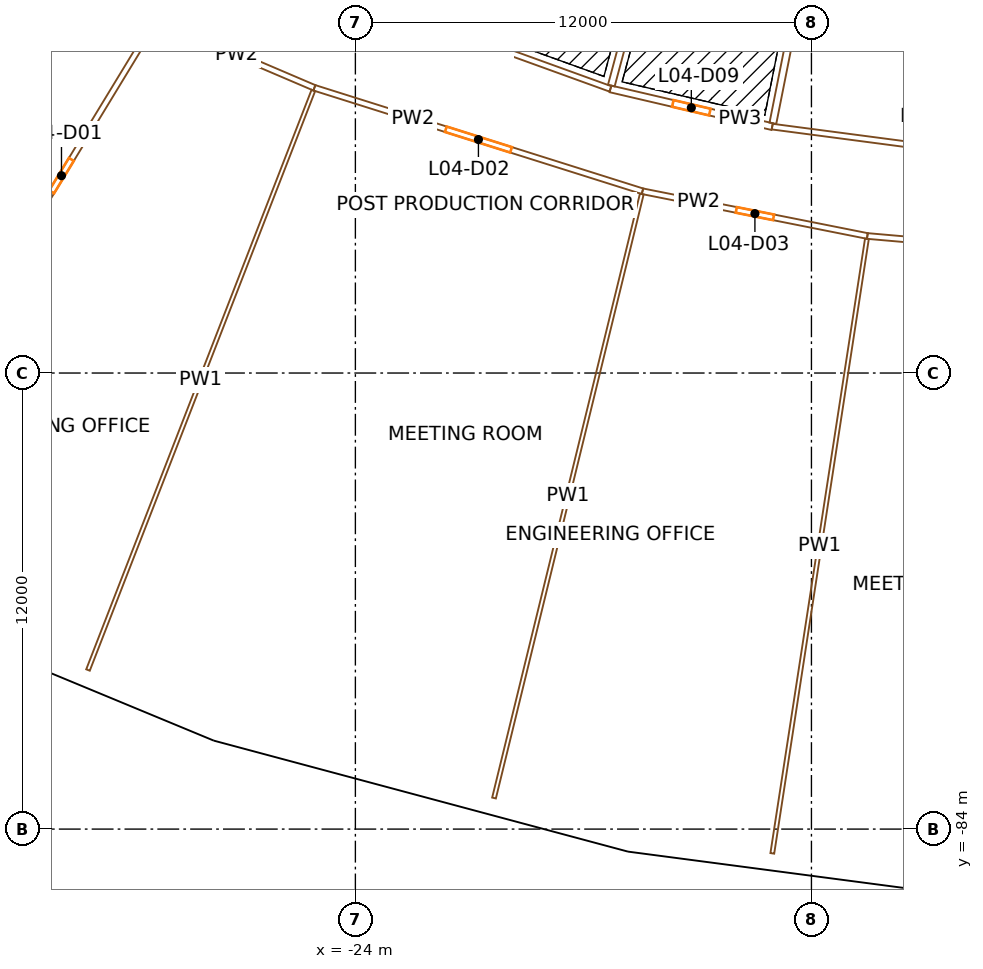
"""IFC4 building model, lengths in metres.
Left out: names, types, materials, properties, quantities, classifications, styles, units other than length and angle.
Written with IfcOpenShell. Run it as: python <this file> out.ifc"""

import sys

from ifc_helpers import new_model, si_unit, direction, frame, frame_2d, origin, origin_2d, place, context, subcontext, project, spatial, rectangle, extrude, element, fill, save


model = new_model("IFC4")
c1 = context("Model", 3, precision=1e-05, world=origin(), true_north=direction((0.0, 1.0)))
c2 = subcontext(c1, "Body", "Model", "MODEL_VIEW")
j1 = project(units=[si_unit("LENGTHUNIT", "METRE"), si_unit("PLANEANGLEUNIT", "RADIAN")], contexts=[c1])
p1 = place(None, origin())
s1 = spatial("IfcSite", under=j1, at=p1, CompositionType="ELEMENT")
p2 = place(p1, origin())
s2 = spatial("IfcBuilding", under=s1, at=p2, CompositionType="ELEMENT")
p3 = place(p2, frame((0.0, 0.0, 31.5)))
s3 = spatial("IfcBuildingStorey", under=s2, at=p3, CompositionType="ELEMENT", Elevation=31.5)
p4 = place(p3, frame((-24.992, -73.624, 0.0), z_axis=(0.0, 0.0, 1.0), x_axis=(0.946930129495, -0.321439465303, 0.0)))
e1 = element("IfcColumn", 1, at=p4, inside=s3, PredefinedType="COLUMN", context=c2, shape_type="SweptSolid", body=[
    extrude(rectangle(XDim=1.4, YDim=1.8, at=origin_2d()), origin(), (0.0, 0.0, 1.0), 4.5),
])
p5 = place(p3, frame((-27.403, -80.726, 0.0), z_axis=(0.0, 0.0, 1.0), x_axis=(0.946930129495, -0.321439465303, 0.0)))
e2 = element("IfcColumn", 2, at=p5, inside=s3, PredefinedType="COLUMN", context=c2, shape_type="SweptSolid", body=[
    extrude(rectangle(XDim=1.1, YDim=1.3, at=origin_2d()), origin(), (0.0, 0.0, 1.0), 4.5),
])
p6 = place(p3, frame((-15.168, -76.256, 0.0), z_axis=(0.0, 0.0, 1.0), x_axis=(0.980785280403, -0.195090322016, 0.0)))
e3 = element("IfcColumn", 3, at=p6, inside=s3, PredefinedType="COLUMN", context=c2, shape_type="SweptSolid", body=[
    extrude(rectangle(XDim=1.4, YDim=1.8, at=origin_2d()), origin(), (0.0, 0.0, 1.0), 4.5),
])
p7 = place(p3, frame((-16.631, -83.612, 0.0), z_axis=(0.0, 0.0, 1.0), x_axis=(0.980785280403, -0.195090322016, 0.0)))
e4 = element("IfcColumn", 4, at=p7, inside=s3, PredefinedType="COLUMN", context=c2, shape_type="SweptSolid", body=[
    extrude(rectangle(XDim=1.1, YDim=1.3, at=origin_2d()), origin(), (0.0, 0.0, 1.0), 4.5),
])
p8 = place(p3, frame((-36.717, -66.337, 0.0), z_axis=(0.0, 0.0, 1.0), x_axis=(0.573577477574, 0.819151315216, 0.0)))
e5 = element("IfcWall", 5, at=p8, inside=s3, PredefinedType="SHEAR", context=c2, shape_type="SweptSolid", body=[
    extrude(rectangle(XDim=14.8, YDim=0.9, at=frame_2d((7.4, 0.0))), origin(), (0.0, 0.0, 1.0), 4.1),
])
p9 = place(p8, frame((6.2, 0.0, 0.0)))
e6 = element("IfcOpeningElement", 6, at=p9, cuts=e5, PredefinedType="OPENING", context=c2, shape_type="SweptSolid", body=[
    extrude(rectangle(XDim=2.4, YDim=2.1, at=frame_2d((1.2, 1.05))), frame((0.0, 0.46, 0.0), z_axis=(0.0, -1.0, 0.0), x_axis=(1.0, 0.0, 0.0)), (0.0, 0.0, 1.0), 0.92),
])
p10 = place(p3, frame((-37.993, -77.176, 0.0), z_axis=(0.0, 0.0, 1.0), x_axis=(0.923874126662, -0.382696482978, 0.0)))
e7 = element("IfcWall", 7, at=p10, inside=s3, PredefinedType="SOLIDWALL", context=c2, shape_type="SweptSolid", body=[
    extrude(rectangle(XDim=11.135, YDim=0.45, at=frame_2d((5.567, 0.0))), origin(), (0.0, 0.0, 1.0), 3.2),
])
p11 = place(p10, frame((3.917, 0.0, 0.9)))
e8 = element("IfcOpeningElement", 8, at=p11, cuts=e7, PredefinedType="OPENING", context=c2, shape_type="SweptSolid", body=[
    extrude(rectangle(XDim=1.2, YDim=2.15, at=frame_2d((0.6, 1.075))), frame((0.0, 0.235, 0.0), z_axis=(0.0, -1.0, 0.0), x_axis=(1.0, 0.0, 0.0)), (0.0, 0.0, 1.0), 0.47),
])
p12 = place(p10, frame((6.017, 0.0, 0.9)))
e9 = element("IfcOpeningElement", 9, at=p12, cuts=e7, PredefinedType="OPENING", context=c2, shape_type="SweptSolid", body=[
    extrude(rectangle(XDim=1.2, YDim=2.15, at=frame_2d((0.6, 1.075))), frame((0.0, 0.235, 0.0), z_axis=(0.0, -1.0, 0.0), x_axis=(1.0, 0.0, 0.0)), (0.0, 0.0, 1.0), 0.47),
])
p13 = place(p3, frame((-27.681, -81.451, 0.0), z_axis=(0.0, 0.0, 1.0), x_axis=(0.965923678926, -0.258827059038, 0.0)))
e10 = element("IfcWall", 10, at=p13, inside=s3, PredefinedType="SOLIDWALL", context=c2, shape_type="SweptSolid", body=[
    extrude(rectangle(XDim=11.312, YDim=0.45, at=frame_2d((5.656, 0.0))), origin(), (0.0, 0.0, 1.0), 3.2),
])
p14 = place(p13, frame((4.006, 0.0, 0.9)))
e11 = element("IfcOpeningElement", 11, at=p14, cuts=e10, PredefinedType="OPENING", context=c2, shape_type="SweptSolid", body=[
    extrude(rectangle(XDim=1.2, YDim=2.15, at=frame_2d((0.6, 1.075))), frame((0.0, 0.235, 0.0), z_axis=(0.0, -1.0, 0.0), x_axis=(1.0, 0.0, 0.0)), (0.0, 0.0, 1.0), 0.47),
])
p15 = place(p13, frame((6.106, 0.0, 0.9)))
e12 = element("IfcOpeningElement", 12, at=p15, cuts=e10, PredefinedType="OPENING", context=c2, shape_type="SweptSolid", body=[
    extrude(rectangle(XDim=1.2, YDim=2.15, at=frame_2d((0.6, 1.075))), frame((0.0, 0.235, 0.0), z_axis=(0.0, -1.0, 0.0), x_axis=(1.0, 0.0, 0.0)), (0.0, 0.0, 1.0), 0.47),
])
p16 = place(p3, frame((-16.724, -84.379, 0.0), z_axis=(0.0, 0.0, 1.0), x_axis=(0.991447502826, -0.130506126829, 0.0)))
e13 = element("IfcWall", 13, at=p16, inside=s3, PredefinedType="SOLIDWALL", context=c2, shape_type="SweptSolid", body=[
    extrude(rectangle(XDim=11.135, YDim=0.45, at=frame_2d((5.567, 0.0))), origin(), (0.0, 0.0, 1.0), 3.2),
])
p17 = place(p16, frame((3.917, 0.0, 0.9)))
e14 = element("IfcOpeningElement", 14, at=p17, cuts=e13, PredefinedType="OPENING", context=c2, shape_type="SweptSolid", body=[
    extrude(rectangle(XDim=1.2, YDim=2.15, at=frame_2d((0.6, 1.075))), frame((0.0, 0.235, 0.0), z_axis=(0.0, -1.0, 0.0), x_axis=(1.0, 0.0, 0.0)), (0.0, 0.0, 1.0), 0.47),
])
p18 = place(p16, frame((6.017, 0.0, 0.9)))
e15 = element("IfcOpeningElement", 15, at=p18, cuts=e13, PredefinedType="OPENING", context=c2, shape_type="SweptSolid", body=[
    extrude(rectangle(XDim=1.2, YDim=2.15, at=frame_2d((0.6, 1.075))), frame((0.0, 0.235, 0.0), z_axis=(0.0, -1.0, 0.0), x_axis=(1.0, 0.0, 0.0)), (0.0, 0.0, 1.0), 0.47),
])
p19 = place(p3, frame((-31.035, -79.814, 0.0), z_axis=(0.0, 0.0, 1.0), x_axis=(0.362399453939, 0.932022872995, 0.0)))
e16 = element("IfcWall", 16, at=p19, inside=s3, PredefinedType="PARTITIONING", context=c2, shape_type="SweptSolid", body=[
    extrude(rectangle(XDim=16.361, YDim=0.1, at=frame_2d((8.18, 0.0))), origin(), (0.0, 0.0, 1.0), 3.1),
])
p20 = place(p3, frame((-29.207, -62.652, 0.0), z_axis=(0.0, 0.0, 1.0), x_axis=(-0.519573423316, -0.854425805897, 0.0)))
e17 = element("IfcWall", 17, at=p20, inside=s3, PredefinedType="PARTITIONING", context=c2, shape_type="SweptSolid", body=[
    extrude(rectangle(XDim=9.726, YDim=0.15, at=frame_2d((4.863, 0.0))), origin(), (0.0, 0.0, 1.0), 3.1),
])
p21 = place(p20, frame((4.363, 0.0, 0.0)))
e18 = element("IfcOpeningElement", 18, at=p21, cuts=e17, PredefinedType="OPENING", context=c2, shape_type="SweptSolid", body=[
    extrude(rectangle(XDim=1.0, YDim=2.1, at=frame_2d((0.5, 1.05))), frame((0.0, 0.085, 0.0), z_axis=(0.0, -1.0, 0.0), x_axis=(1.0, 0.0, 0.0)), (0.0, 0.0, 1.0), 0.17),
])
p22 = place(p3, frame((-29.177, -62.746, 0.0), z_axis=(0.0, 0.0, 1.0), x_axis=(0.91966288709, -0.392708765001, 0.0)))
e19 = element("IfcWall", 19, at=p22, inside=s3, PredefinedType="PARTITIONING", context=c2, shape_type="SweptSolid", body=[
    extrude(rectangle(XDim=4.456, YDim=0.15, at=frame_2d((2.228, 0.0))), origin(), (0.0, 0.0, 1.0), 3.1),
])
p23 = place(p3, frame((-27.92, -60.678, 0.0), z_axis=(0.0, 0.0, 1.0), x_axis=(0.940369024046, -0.340155991589, 0.0)))
e20 = element("IfcWall", 20, at=p23, inside=s3, PredefinedType="PARTITIONING", context=c2, shape_type="SweptSolid", body=[
    extrude(rectangle(XDim=11.305, YDim=0.15, at=frame_2d((5.652, 0.0))), origin(), (0.0, 0.0, 1.0), 3.1),
])
p24 = place(p23, frame((4.752, 0.0, 0.0)))
e21 = element("IfcOpeningElement", 21, at=p24, cuts=e20, PredefinedType="OPENING", context=c2, shape_type="SweptSolid", body=[
    extrude(rectangle(XDim=1.8, YDim=2.1, at=frame_2d((0.9, 1.05))), frame((0.0, 0.085, 0.0), z_axis=(0.0, -1.0, 0.0), x_axis=(1.0, 0.0, 0.0)), (0.0, 0.0, 1.0), 0.17),
])
p25 = place(p3, frame((-16.446, -67.217, 0.0), z_axis=(0.0, 0.0, 1.0), x_axis=(-0.953724416281, 0.300682120834, 0.0)))
e22 = element("IfcWall", 22, at=p25, inside=s3, PredefinedType="PARTITIONING", context=c2, shape_type="SweptSolid", body=[
    extrude(rectangle(XDim=9.052, YDim=0.15, at=frame_2d((4.526, 0.0))), origin(), (0.0, 0.0, 1.0), 3.1),
])
p26 = place(p25, frame((3.626, 0.0, 0.0)))
e23 = element("IfcOpeningElement", 23, at=p26, cuts=e22, PredefinedType="OPENING", context=c2, shape_type="SweptSolid", body=[
    extrude(rectangle(XDim=1.8, YDim=2.1, at=frame_2d((0.9, 1.05))), frame((0.0, 0.085, 0.0), z_axis=(0.0, -1.0, 0.0), x_axis=(1.0, 0.0, 0.0)), (0.0, 0.0, 1.0), 0.17),
])
p27 = place(p3, frame((-20.352, -83.182, 0.0), z_axis=(0.0, 0.0, 1.0), x_axis=(0.23765209547, 0.971350339228, 0.0)))
e24 = element("IfcWall", 24, at=p27, inside=s3, PredefinedType="PARTITIONING", context=c2, shape_type="SweptSolid", body=[
    extrude(rectangle(XDim=16.361, YDim=0.1, at=frame_2d((8.18, 0.0))), origin(), (0.0, 0.0, 1.0), 3.1),
])
p28 = place(p3, frame((-17.289, -64.524, 0.0), z_axis=(0.0, 0.0, 1.0), x_axis=(0.973886095728, -0.227037161159, 0.0)))
e25 = element("IfcWall", 25, at=p28, inside=s3, PredefinedType="PARTITIONING", context=c2, shape_type="SweptSolid", body=[
    extrude(rectangle(XDim=4.371, YDim=0.18, at=frame_2d((2.186, 0.0))), origin(), (0.0, 0.0, 1.0), 3.1),
])
p29 = place(p28, frame((1.686, 0.0, 0.0)))
e26 = element("IfcOpeningElement", 26, at=p29, cuts=e25, PredefinedType="OPENING", context=c2, shape_type="SweptSolid", body=[
    extrude(rectangle(XDim=1.0, YDim=2.1, at=frame_2d((0.5, 1.05))), frame((0.0, 0.1, 0.0), z_axis=(0.0, -1.0, 0.0), x_axis=(1.0, 0.0, 0.0)), (0.0, 0.0, 1.0), 0.2),
])
p30 = place(p3, frame((-10.529, -68.394, 0.0), z_axis=(0.0, 0.0, 1.0), x_axis=(-0.980785582749, 0.195088802015, 0.0)))
e27 = element("IfcWall", 27, at=p30, inside=s3, PredefinedType="PARTITIONING", context=c2, shape_type="SweptSolid", body=[
    extrude(rectangle(XDim=6.033, YDim=0.15, at=frame_2d((3.017, 0.0))), origin(), (0.0, 0.0, 1.0), 3.1),
])
p31 = place(p30, frame((2.517, 0.0, 0.0)))
e28 = element("IfcOpeningElement", 28, at=p31, cuts=e27, PredefinedType="OPENING", context=c2, shape_type="SweptSolid", body=[
    extrude(rectangle(XDim=1.0, YDim=2.1, at=frame_2d((0.5, 1.05))), frame((0.0, 0.085, 0.0), z_axis=(0.0, -1.0, 0.0), x_axis=(1.0, 0.0, 0.0)), (0.0, 0.0, 1.0), 0.17),
])
p32 = place(p3, frame((-13.03, -84.639, 0.0), z_axis=(0.0, 0.0, 1.0), x_axis=(0.15214688942, 0.988357892689, 0.0)))
e29 = element("IfcWall", 29, at=p32, inside=s3, PredefinedType="PARTITIONING", context=c2, shape_type="SweptSolid", body=[
    extrude(rectangle(XDim=16.361, YDim=0.1, at=frame_2d((8.18, 0.0))), origin(), (0.0, 0.0, 1.0), 3.1),
])
p33 = place(p3, frame((-13.032, -65.516, 0.0), z_axis=(0.0, 0.0, 1.0), x_axis=(0.991443260322, -0.130538352841, 0.0)))
e30 = element("IfcWall", 30, at=p33, inside=s3, PredefinedType="PARTITIONING", context=c2, shape_type="SweptSolid", body=[
    extrude(rectangle(XDim=8.738, YDim=0.15, at=frame_2d((4.369, 0.0))), origin(), (0.0, 0.0, 1.0), 3.1),
])
p34 = place(p33, frame((3.869, 0.0, 0.0)))
e31 = element("IfcOpeningElement", 31, at=p34, cuts=e30, PredefinedType="OPENING", context=c2, shape_type="SweptSolid", body=[
    extrude(rectangle(XDim=1.0, YDim=2.1, at=frame_2d((0.5, 1.05))), frame((0.0, 0.085, 0.0), z_axis=(0.0, -1.0, 0.0), x_axis=(1.0, 0.0, 0.0)), (0.0, 0.0, 1.0), 0.17),
])
p35 = place(p3, frame((-12.965, -48.386, 0.0), z_axis=(0.0, 0.0, 1.0), x_axis=(-0.258822009397, -0.965925032004, 0.0)))
e32 = element("IfcWall", 32, at=p35, inside=s3, PredefinedType="PARTITIONING", context=c2, shape_type="SweptSolid", body=[
    extrude(rectangle(XDim=16.617, YDim=0.18, at=frame_2d((8.308, 0.0))), origin(), (0.0, 0.0, 1.0), 3.1),
])
p36 = place(p3, frame((-1.511, -69.184, 0.0), z_axis=(0.0, 0.0, 1.0), x_axis=(-0.996190935779, 0.087198735491, 0.0)))
e33 = element("IfcWall", 33, at=p36, inside=s3, PredefinedType="PARTITIONING", context=c2, shape_type="SweptSolid", body=[
    extrude(rectangle(XDim=9.052, YDim=0.15, at=frame_2d((4.526, 0.0))), origin(), (0.0, 0.0, 1.0), 3.1),
])
p37 = place(p36, frame((3.626, 0.0, 0.0)))
e34 = element("IfcOpeningElement", 34, at=p37, cuts=e33, PredefinedType="OPENING", context=c2, shape_type="SweptSolid", body=[
    extrude(rectangle(XDim=1.8, YDim=2.1, at=frame_2d((0.9, 1.05))), frame((0.0, 0.085, 0.0), z_axis=(0.0, -1.0, 0.0), x_axis=(1.0, 0.0, 0.0)), (0.0, 0.0, 1.0), 0.17),
])
p38 = place(p3, frame((-9.793, -49.235, 0.0), z_axis=(0.0, 0.0, 1.0), x_axis=(-0.195089444663, -0.980785454919, 0.0)))
e35 = element("IfcWall", 35, at=p38, inside=s3, PredefinedType="PARTITIONING", context=c2, shape_type="SweptSolid", body=[
    extrude(rectangle(XDim=16.51, YDim=0.18, at=frame_2d((8.255, 0.0))), origin(), (0.0, 0.0, 1.0), 3.1),
])
p39 = place(p12, origin())
e36 = element("IfcWindow", 36, at=p39, inside=s3, PartitioningType="SINGLE_PANEL", PredefinedType="WINDOW", context=c2, shape_type="SweptSolid", body=[
    extrude(rectangle(XDim=1.2, YDim=2.15, at=frame_2d((0.6, 1.075))), frame((0.0, 0.03, 0.0), z_axis=(0.0, -1.0, 0.0), x_axis=(1.0, 0.0, 0.0)), (0.0, 0.0, 1.0), 0.06),
])
fill(e9, e36)
p40 = place(p14, origin())
e37 = element("IfcWindow", 37, at=p40, inside=s3, PartitioningType="SINGLE_PANEL", PredefinedType="WINDOW", context=c2, shape_type="SweptSolid", body=[
    extrude(rectangle(XDim=1.2, YDim=2.15, at=frame_2d((0.6, 1.075))), frame((0.0, 0.03, 0.0), z_axis=(0.0, -1.0, 0.0), x_axis=(1.0, 0.0, 0.0)), (0.0, 0.0, 1.0), 0.06),
])
fill(e11, e37)
p41 = place(p15, origin())
e38 = element("IfcWindow", 38, at=p41, inside=s3, PartitioningType="SINGLE_PANEL", PredefinedType="WINDOW", context=c2, shape_type="SweptSolid", body=[
    extrude(rectangle(XDim=1.2, YDim=2.15, at=frame_2d((0.6, 1.075))), frame((0.0, 0.03, 0.0), z_axis=(0.0, -1.0, 0.0), x_axis=(1.0, 0.0, 0.0)), (0.0, 0.0, 1.0), 0.06),
])
fill(e12, e38)
p42 = place(p17, origin())
e39 = element("IfcWindow", 39, at=p42, inside=s3, PartitioningType="SINGLE_PANEL", PredefinedType="WINDOW", context=c2, shape_type="SweptSolid", body=[
    extrude(rectangle(XDim=1.2, YDim=2.15, at=frame_2d((0.6, 1.075))), frame((0.0, 0.03, 0.0), z_axis=(0.0, -1.0, 0.0), x_axis=(1.0, 0.0, 0.0)), (0.0, 0.0, 1.0), 0.06),
])
fill(e14, e39)
p43 = place(p18, origin())
e40 = element("IfcWindow", 40, at=p43, inside=s3, PartitioningType="SINGLE_PANEL", PredefinedType="WINDOW", context=c2, shape_type="SweptSolid", body=[
    extrude(rectangle(XDim=1.2, YDim=2.15, at=frame_2d((0.6, 1.075))), frame((0.0, 0.03, 0.0), z_axis=(0.0, -1.0, 0.0), x_axis=(1.0, 0.0, 0.0)), (0.0, 0.0, 1.0), 0.06),
])
fill(e15, e40)
p44 = place(p21, origin())
e41 = element("IfcDoor", 41, at=p44, inside=s3, OperationType="SINGLE_SWING_RIGHT", PredefinedType="DOOR", context=c2, shape_type="SweptSolid", body=[
    extrude(rectangle(XDim=1.0, YDim=2.1, at=frame_2d((0.5, 1.05))), frame((0.0, 0.025, 0.0), z_axis=(0.0, -1.0, 0.0), x_axis=(1.0, 0.0, 0.0)), (0.0, 0.0, 1.0), 0.05),
])
fill(e18, e41)
p45 = place(p26, origin())
e42 = element("IfcDoor", 42, at=p45, inside=s3, OperationType="DOUBLE_DOOR_SINGLE_SWING", PredefinedType="DOOR", context=c2, shape_type="SweptSolid", body=[
    extrude(rectangle(XDim=1.8, YDim=2.1, at=frame_2d((0.9, 1.05))), frame((0.0, 0.025, 0.0), z_axis=(0.0, -1.0, 0.0), x_axis=(1.0, 0.0, 0.0)), (0.0, 0.0, 1.0), 0.05),
])
fill(e23, e42)
p46 = place(p31, origin())
e43 = element("IfcDoor", 43, at=p46, inside=s3, OperationType="SINGLE_SWING_RIGHT", PredefinedType="DOOR", context=c2, shape_type="SweptSolid", body=[
    extrude(rectangle(XDim=1.0, YDim=2.1, at=frame_2d((0.5, 1.05))), frame((0.0, 0.025, 0.0), z_axis=(0.0, -1.0, 0.0), x_axis=(1.0, 0.0, 0.0)), (0.0, 0.0, 1.0), 0.05),
])
fill(e28, e43)
p47 = place(p29, origin())
e44 = element("IfcDoor", 44, at=p47, inside=s3, OperationType="SINGLE_SWING_RIGHT", PredefinedType="DOOR", context=c2, shape_type="SweptSolid", body=[
    extrude(rectangle(XDim=1.0, YDim=2.1, at=frame_2d((0.5, 1.05))), frame((0.0, 0.025, 0.0), z_axis=(0.0, -1.0, 0.0), x_axis=(1.0, 0.0, 0.0)), (0.0, 0.0, 1.0), 0.05),
])
fill(e26, e44)
save(model, sys.argv[1])
